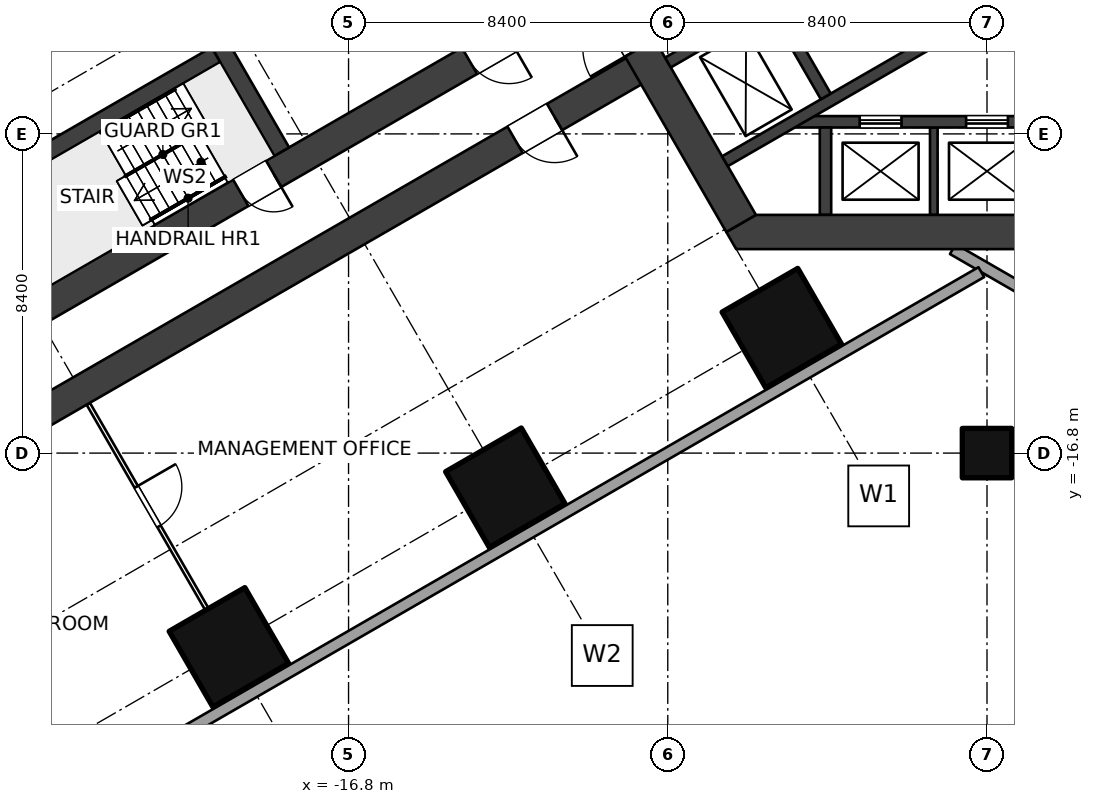
"""IFC4 building model, lengths in metres.
Left out: names, types, materials, properties, quantities, classifications, styles, units other than length and angle.
Written with IfcOpenShell. Run it as: python <this file> out.ifc"""

import sys

from ifc_helpers import new_model, si_unit, direction, frame, frame_2d, origin, origin_2d, place, context, subcontext, project, spatial, polyline, rectangle, outline, extrude, element, fill, save


model = new_model("IFC4")
c1 = context("Model", 3, precision=1e-05, world=origin(), true_north=direction((0.0, 1.0)))
c2 = subcontext(c1, "Body", "Model", "MODEL_VIEW")
j1 = project(units=[si_unit("LENGTHUNIT", "METRE"), si_unit("PLANEANGLEUNIT", "RADIAN")], contexts=[c1])
p1 = place(None, origin())
s1 = spatial("IfcSite", under=j1, at=p1, CompositionType="ELEMENT")
p2 = place(p1, origin())
s2 = spatial("IfcBuilding", under=s1, at=p2, CompositionType="ELEMENT")
p3 = place(p2, origin())
s3 = spatial("IfcBuildingStorey", under=s2, at=p3, CompositionType="ELEMENT", Elevation=0.0)
for number, where, z_axis, x_axis in (
    (1, (-5.4, -13.51, 0.0), (0.0, 0.0, 1.0), (-0.5, 0.866, 0.0)),
    (2, (-12.675, -17.71, 0.0), (0.0, 0.0, 1.0), (-0.5, 0.866, 0.0)),
    (3, (-19.949, -21.91, 0.0), (0.0, 0.0, 1.0), (-0.5, 0.866, 0.0)),
):
    element("IfcColumn", number, at=place(p3, frame(where, z_axis=z_axis, x_axis=x_axis)), inside=s3, PredefinedType="COLUMN", context=c2, shape_type="SweptSolid", body=[
        extrude(rectangle(XDim=2.3, YDim=2.3, at=origin_2d()), origin(), (0.0, 0.0, 1.0), 6.0),
    ])
p4 = place(p3, frame((0.0, -16.8, 0.0), z_axis=(0.0, 0.0, 1.0), x_axis=(1.0, 0.0, 0.0)))
e4 = element("IfcColumn", 4, at=p4, inside=s3, PredefinedType="COLUMN", context=c2, shape_type="SweptSolid", body=[
    extrude(rectangle(XDim=1.3, YDim=1.3, at=origin_2d()), origin(), (0.0, 0.0, 1.0), 6.0),
])
p5 = place(p3, frame((-6.47, -10.757, 0.0), z_axis=(0.0, 0.0, 1.0), x_axis=(-0.499997612506, 0.8660267822, 0.0)))
e5 = element("IfcWall", 5, at=p5, inside=s3, PredefinedType="SHEAR", context=c2, shape_type="SweptSolid", body=[
    extrude(rectangle(XDim=12.161, YDim=0.9, at=frame_2d((6.08, 0.0))), origin(), (0.0, 0.0, 1.0), 6.0),
])
p6 = place(p5, frame((5.33, 0.0, 0.0)))
e6 = element("IfcOpeningElement", 6, at=p6, cuts=e5, PredefinedType="OPENING", context=c2, shape_type="SweptSolid", body=[
    extrude(rectangle(XDim=1.5, YDim=2.1, at=frame_2d((0.75, 1.05))), frame((0.0, 0.46, 0.0), z_axis=(0.0, -1.0, 0.0), x_axis=(1.0, 0.0, 0.0)), (0.0, 0.0, 1.0), 0.92),
])
p7 = place(p3, origin())
e7 = element("IfcWall", 7, at=p7, inside=s3, PredefinedType="SHEAR", context=c2, shape_type="SweptSolid", body=[
    extrude(outline(polyline([(-6.6, -11.432), (6.6, -11.432), (6.86, -10.981), (6.08, -10.531), (-6.08, -10.531), (-6.86, -10.981), (-6.6, -11.432)])), origin(), (0.0, 0.0, 1.0), 6.0),
])
p8 = place(p3, frame((-2.419, -3.071, 0.0), z_axis=(0.0, 0.0, 1.0), x_axis=(-0.86602711848, -0.499997030048, 0.0)))
e8 = element("IfcWall", 8, at=p8, inside=s3, PredefinedType="SHEAR", context=c2, shape_type="SweptSolid", body=[
    extrude(rectangle(XDim=6.901, YDim=0.3, at=frame_2d((3.451, 0.0))), origin(), (0.0, 0.0, 1.0), 6.0),
])
p9 = place(p8, frame((4.85, 0.0, 0.0)))
e9 = element("IfcOpeningElement", 9, at=p9, cuts=e8, PredefinedType="OPENING", context=c2, shape_type="SweptSolid", body=[
    extrude(rectangle(XDim=1.1, YDim=2.1, at=frame_2d((0.55, 1.05))), frame((0.0, 0.16, 0.0), z_axis=(0.0, -1.0, 0.0), x_axis=(1.0, 0.0, 0.0)), (0.0, 0.0, 1.0), 0.32),
])
p10 = place(p3, frame((-0.919, -5.669, 0.0), z_axis=(0.0, 0.0, 1.0), x_axis=(-0.866011800373, -0.500023561059, 0.0)))
e10 = element("IfcWall", 10, at=p10, inside=s3, PredefinedType="SHEAR", context=c2, shape_type="SweptSolid", body=[
    extrude(rectangle(XDim=6.902, YDim=0.3, at=frame_2d((3.451, 0.0))), origin(), (0.0, 0.0, 1.0), 6.0),
])
p11 = place(p3, frame((-4.241, -7.414, 0.0), z_axis=(0.0, 0.0, 1.0), x_axis=(-0.500048589285, 0.86599734893, 0.0)))
e11 = element("IfcWall", 11, at=p11, inside=s3, PredefinedType="SHEAR", context=c2, shape_type="SweptSolid", body=[
    extrude(rectangle(XDim=2.7, YDim=0.3, at=frame_2d((1.35, 0.0))), origin(), (0.0, 0.0, 1.0), 6.0),
])
p12 = place(p3, frame((5.098, -8.082, 0.0), z_axis=(0.0, 0.0, 1.0), x_axis=(-1.0, 0.0, 0.0)))
e12 = element("IfcWall", 12, at=p12, inside=s3, PredefinedType="SHEAR", context=c2, shape_type="SweptSolid", body=[
    extrude(rectangle(XDim=10.195, YDim=0.3, at=frame_2d((5.098, 0.0))), origin(), (0.0, 0.0, 1.0), 6.0),
])
p13 = place(p12, frame((1.748, 0.0, 0.0)))
e13 = element("IfcOpeningElement", 13, at=p13, cuts=e12, PredefinedType="OPENING", context=c2, shape_type="SweptSolid", body=[
    extrude(rectangle(XDim=1.1, YDim=2.1, at=frame_2d((0.55, 1.05))), frame((0.0, 0.16, 0.0), z_axis=(0.0, -1.0, 0.0), x_axis=(1.0, 0.0, 0.0)), (0.0, 0.0, 1.0), 0.32),
])
p14 = place(p12, frame((4.548, 0.0, 0.0)))
e14 = element("IfcOpeningElement", 14, at=p14, cuts=e12, PredefinedType="OPENING", context=c2, shape_type="SweptSolid", body=[
    extrude(rectangle(XDim=1.1, YDim=2.1, at=frame_2d((0.55, 1.05))), frame((0.0, 0.16, 0.0), z_axis=(0.0, -1.0, 0.0), x_axis=(1.0, 0.0, 0.0)), (0.0, 0.0, 1.0), 0.32),
])
p15 = place(p12, frame((7.348, 0.0, 0.0)))
e15 = element("IfcOpeningElement", 15, at=p15, cuts=e12, PredefinedType="OPENING", context=c2, shape_type="SweptSolid", body=[
    extrude(rectangle(XDim=1.1, YDim=2.1, at=frame_2d((0.55, 1.05))), frame((0.0, 0.16, 0.0), z_axis=(0.0, -1.0, 0.0), x_axis=(1.0, 0.0, 0.0)), (0.0, 0.0, 1.0), 0.32),
])
p16 = place(p3, frame((-4.25, -8.231, 0.0), z_axis=(0.0, 0.0, 1.0), x_axis=(0.0, -1.0, 0.0)))
e16 = element("IfcWall", 16, at=p16, inside=s3, PredefinedType="SHEAR", context=c2, shape_type="SweptSolid", body=[
    extrude(rectangle(XDim=2.3, YDim=0.3, at=frame_2d((1.15, 0.0))), origin(), (0.0, 0.0, 1.0), 6.0),
])
p17 = place(p3, frame((-1.4, -8.231, 0.0), z_axis=(0.0, 0.0, 1.0), x_axis=(0.0, -1.0, 0.0)))
e17 = element("IfcWall", 17, at=p17, inside=s3, PredefinedType="SHEAR", context=c2, shape_type="SweptSolid", body=[
    extrude(rectangle(XDim=2.3, YDim=0.2, at=frame_2d((1.15, 0.0))), origin(), (0.0, 0.0, 1.0), 6.0),
])
p18 = place(p3, frame((-8.91, -6.53, 0.0), z_axis=(0.0, 0.0, 1.0), x_axis=(-0.866025284237, -0.500000207062, 0.0)))
e18 = element("IfcWall", 18, at=p18, inside=s3, PredefinedType="SHEAR", context=c2, shape_type="SweptSolid", body=[
    extrude(rectangle(XDim=36.75, YDim=0.8, at=frame_2d((18.375, 0.0))), origin(), (0.0, 0.0, 1.0), 6.0),
])
p19 = place(p18, frame((2.85, 0.0, 0.0)))
e19 = element("IfcOpeningElement", 19, at=p19, cuts=e18, PredefinedType="OPENING", context=c2, shape_type="SweptSolid", body=[
    extrude(rectangle(XDim=1.2, YDim=2.1, at=frame_2d((0.6, 1.05))), frame((0.0, 0.41, 0.0), z_axis=(0.0, -1.0, 0.0), x_axis=(1.0, 0.0, 0.0)), (0.0, 0.0, 1.0), 0.82),
])
p20 = place(p3, frame((-10.11, -4.451, 0.0), z_axis=(0.0, 0.0, 1.0), x_axis=(-0.866025284237, -0.500000207062, 0.0)))
e20 = element("IfcWall", 20, at=p20, inside=s3, PredefinedType="SHEAR", context=c2, shape_type="SweptSolid", body=[
    extrude(rectangle(XDim=36.75, YDim=0.8, at=frame_2d((18.375, 0.0))), origin(), (0.0, 0.0, 1.0), 6.0),
])
p21 = place(p20, frame((10.0, 0.0, 0.0)))
e21 = element("IfcOpeningElement", 21, at=p21, cuts=e20, PredefinedType="OPENING", context=c2, shape_type="SweptSolid", body=[
    extrude(rectangle(XDim=1.0, YDim=2.1, at=frame_2d((0.5, 1.05))), frame((0.0, 0.41, 0.0), z_axis=(0.0, -1.0, 0.0), x_axis=(1.0, 0.0, 0.0)), (0.0, 0.0, 1.0), 0.82),
])
p22 = place(p20, frame((2.85, 0.0, 0.0)))
e22 = element("IfcOpeningElement", 22, at=p22, cuts=e20, PredefinedType="OPENING", context=c2, shape_type="SweptSolid", body=[
    extrude(rectangle(XDim=1.2, YDim=2.1, at=frame_2d((0.6, 1.05))), frame((0.0, 0.41, 0.0), z_axis=(0.0, -1.0, 0.0), x_axis=(1.0, 0.0, 0.0)), (0.0, 0.0, 1.0), 0.82),
])
p23 = place(p3, frame((-23.649, -15.501, 0.0), z_axis=(0.0, 0.0, 1.0), x_axis=(0.500004234368, -0.866022959057, 0.0)))
e23 = element("IfcWall", 23, at=p23, inside=s3, PredefinedType="PARTITIONING", context=c2, shape_type="SweptSolid", body=[
    extrude(rectangle(XDim=6.25, YDim=0.1, at=frame_2d((3.125, 0.0))), origin(), (0.0, 0.0, 1.0), 3.9),
])
p24 = place(p23, frame((2.525, 0.0, 0.0)))
e24 = element("IfcOpeningElement", 24, at=p24, cuts=e23, PredefinedType="OPENING", context=c2, shape_type="SweptSolid", body=[
    extrude(rectangle(XDim=1.2, YDim=2.1, at=frame_2d((0.6, 1.05))), frame((0.0, 0.06, 0.0), z_axis=(0.0, -1.0, 0.0), x_axis=(1.0, 0.0, 0.0)), (0.0, 0.0, 1.0), 0.12),
])
p25 = place(p3, frame((-0.15, -12.038, 0.0), z_axis=(0.0, 0.0, 1.0), x_axis=(-0.866026292622, -0.499998460486, 0.0)))
e25 = element("IfcWall", 25, at=p25, inside=s3, PredefinedType="SOLIDWALL", context=c2, shape_type="SweptSolid", body=[
    extrude(rectangle(XDim=41.883, YDim=0.3, at=frame_2d((20.941, 0.0))), origin(), (0.0, 0.0, 1.0), 5.7),
])
p26 = place(p25, frame((25.383, 0.0, 0.0)))
e26 = element("IfcOpeningElement", 26, at=p26, cuts=e25, PredefinedType="OPENING", context=c2, shape_type="SweptSolid", body=[
    extrude(rectangle(XDim=1.8, YDim=2.4, at=frame_2d((0.9, 1.2))), frame((0.0, 0.16, 0.0), z_axis=(0.0, -1.0, 0.0), x_axis=(1.0, 0.0, 0.0)), (0.0, 0.0, 1.0), 0.32),
])
p27 = place(p3, frame((-9.45, 6.495, 0.0), z_axis=(0.0, 0.0, 1.0), x_axis=(-0.866025301493, -0.500000177174, 0.0)))
e27 = element("IfcWall", 27, at=p27, inside=s3, PredefinedType="SOLIDWALL", context=c2, shape_type="SweptSolid", body=[
    extrude(rectangle(XDim=43.095, YDim=0.3, at=frame_2d((21.548, 0.0))), origin(), (0.0, 0.0, 1.0), 5.7),
])
p28 = place(p27, frame((26.595, 0.0, 0.0)))
e28 = element("IfcOpeningElement", 28, at=p28, cuts=e27, PredefinedType="OPENING", context=c2, shape_type="SweptSolid", body=[
    extrude(rectangle(XDim=1.8, YDim=2.4, at=frame_2d((0.9, 1.2))), frame((0.0, 0.16, 0.0), z_axis=(0.0, -1.0, 0.0), x_axis=(1.0, 0.0, 0.0)), (0.0, 0.0, 1.0), 0.32),
])
p29 = place(p3, frame((-0.9, -11.432, 0.0), z_axis=(0.0, 0.0, 1.0), x_axis=(0.866025301493, -0.500000177174, 0.0)))
e29 = element("IfcWall", 29, at=p29, inside=s3, PredefinedType="SOLIDWALL", context=c2, shape_type="SweptSolid", body=[
    extrude(rectangle(XDim=43.095, YDim=0.3, at=frame_2d((21.548, 0.0))), origin(), (0.0, 0.0, 1.0), 5.7),
])
p30 = place(p29, frame((26.595, 0.0, 0.0)))
e30 = element("IfcOpeningElement", 30, at=p30, cuts=e29, PredefinedType="OPENING", context=c2, shape_type="SweptSolid", body=[
    extrude(rectangle(XDim=1.8, YDim=2.4, at=frame_2d((0.9, 1.2))), frame((0.0, 0.16, 0.0), z_axis=(0.0, -1.0, 0.0), x_axis=(1.0, 0.0, 0.0)), (0.0, 0.0, 1.0), 0.32),
])
p31 = place(p3, frame((-18.559, -8.868, 0.0), z_axis=(0.0, 0.0, 1.0), x_axis=(-0.50002983664, 0.866008176907, 0.0)))
e31 = element("IfcWall", 31, at=p31, inside=s3, PredefinedType="SOLIDWALL", context=c2, shape_type="SweptSolid", body=[
    extrude(rectangle(XDim=3.3, YDim=0.45, at=frame_2d((1.65, 0.0))), origin(), (0.0, 0.0, 1.0), 6.0),
])
p32 = place(p3, frame((-20.292, -6.317, 0.0), z_axis=(0.0, 0.0, 1.0), x_axis=(-0.866028853923, -0.499994024137, 0.0)))
e32 = element("IfcWall", 32, at=p32, inside=s3, PredefinedType="SOLIDWALL", context=c2, shape_type="SweptSolid", body=[
    extrude(rectangle(XDim=6.9, YDim=0.45, at=frame_2d((3.45, 0.0))), origin(), (0.0, 0.0, 1.0), 6.0),
])
p33 = place(p14, origin())
e33 = element("IfcDoor", 33, at=p33, inside=s3, OperationType="DOUBLE_DOOR_SLIDING", PredefinedType="DOOR", context=c2, shape_type="SweptSolid", body=[
    extrude(rectangle(XDim=1.1, YDim=2.1, at=frame_2d((0.55, 1.05))), frame((0.0, 0.025, 0.0), z_axis=(0.0, -1.0, 0.0), x_axis=(1.0, 0.0, 0.0)), (0.0, 0.0, 1.0), 0.05),
])
fill(e14, e33)
p34 = place(p15, origin())
e34 = element("IfcDoor", 34, at=p34, inside=s3, OperationType="DOUBLE_DOOR_SLIDING", PredefinedType="DOOR", context=c2, shape_type="SweptSolid", body=[
    extrude(rectangle(XDim=1.1, YDim=2.1, at=frame_2d((0.55, 1.05))), frame((0.0, 0.025, 0.0), z_axis=(0.0, -1.0, 0.0), x_axis=(1.0, 0.0, 0.0)), (0.0, 0.0, 1.0), 0.05),
])
fill(e15, e34)
p35 = place(p21, origin())
e35 = element("IfcDoor", 35, at=p35, inside=s3, OperationType="SINGLE_SWING_LEFT", PredefinedType="DOOR", context=c2, shape_type="SweptSolid", body=[
    extrude(rectangle(XDim=1.0, YDim=2.1, at=frame_2d((0.5, 1.05))), frame((0.0, 0.025, 0.0), z_axis=(0.0, -1.0, 0.0), x_axis=(1.0, 0.0, 0.0)), (0.0, 0.0, 1.0), 0.05),
])
fill(e21, e35)
p36 = place(p24, origin())
e36 = element("IfcDoor", 36, at=p36, inside=s3, OperationType="DOUBLE_SWING_LEFT", PredefinedType="DOOR", context=c2, shape_type="SweptSolid", body=[
    extrude(rectangle(XDim=1.2, YDim=2.1, at=frame_2d((0.6, 1.05))), frame((0.0, 0.025, 0.0), z_axis=(0.0, -1.0, 0.0), x_axis=(1.0, 0.0, 0.0)), (0.0, 0.0, 1.0), 0.05),
])
fill(e24, e36)
p37 = place(p19, origin())
e37 = element("IfcDoor", 37, at=p37, inside=s3, OperationType="DOUBLE_SWING_LEFT", PredefinedType="DOOR", context=c2, shape_type="SweptSolid", body=[
    extrude(rectangle(XDim=1.2, YDim=2.1, at=frame_2d((0.6, 1.05))), frame((0.0, 0.025, 0.0), z_axis=(0.0, -1.0, 0.0), x_axis=(1.0, 0.0, 0.0)), (0.0, 0.0, 1.0), 0.05),
])
fill(e19, e37)
p38 = place(p22, origin())
e38 = element("IfcDoor", 38, at=p38, inside=s3, OperationType="DOUBLE_SWING_LEFT", PredefinedType="DOOR", context=c2, shape_type="SweptSolid", body=[
    extrude(rectangle(XDim=1.2, YDim=2.1, at=frame_2d((0.6, 1.05))), frame((0.0, 0.025, 0.0), z_axis=(0.0, -1.0, 0.0), x_axis=(1.0, 0.0, 0.0)), (0.0, 0.0, 1.0), 0.05),
])
fill(e22, e38)
save(model, sys.argv[1])
